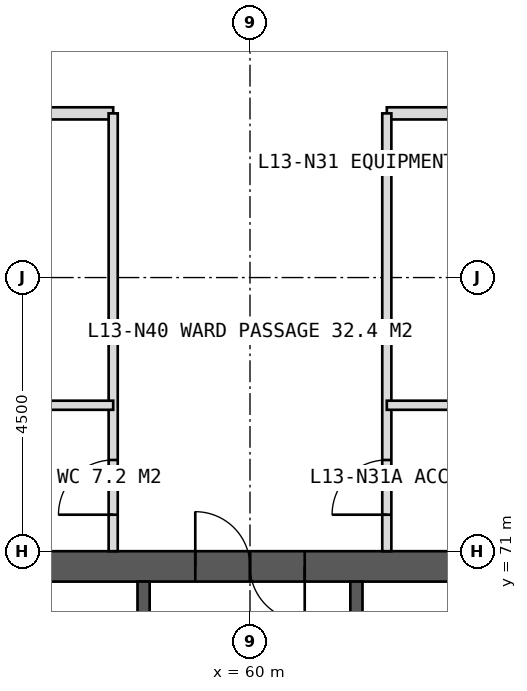
"""IFC4 building model, lengths in metres.
Left out: names, types, materials, properties, quantities, classifications, styles, units other than length and angle.
Written with IfcOpenShell. Run it as: python <this file> out.ifc"""

import sys

from ifc_helpers import new_model, si_unit, direction, frame, frame_2d, origin, place, context, subcontext, project, spatial, rectangle, extrude, element, fill, save


model = new_model("IFC4")
c1 = context("Model", 3, precision=1e-05, world=origin(), true_north=direction((0.0, 1.0)))
c2 = subcontext(c1, "Body", "Model", "MODEL_VIEW")
j1 = project(units=[si_unit("LENGTHUNIT", "METRE"), si_unit("PLANEANGLEUNIT", "RADIAN")], contexts=[c1])
p1 = place(None, origin())
s1 = spatial("IfcSite", under=j1, at=p1, CompositionType="ELEMENT")
p2 = place(p1, origin())
s2 = spatial("IfcBuilding", under=s1, at=p2, CompositionType="ELEMENT")
p3 = place(p2, frame((0.0, 0.0, 59.0)))
s3 = spatial("IfcBuildingStorey", under=s2, at=p3, CompositionType="ELEMENT", Elevation=59.0)
p4 = place(p3, frame((51.0, 70.75, 0.0), z_axis=(0.0, 0.0, 1.0), x_axis=(1.0, 0.0, 0.0)))
e1 = element("IfcWall", 1, at=p4, inside=s3, PredefinedType="SHEAR", context=c2, shape_type="SweptSolid", body=[
    extrude(rectangle(XDim=18.0, YDim=0.5, at=frame_2d((9.0, 0.0))), origin(), (0.0, 0.0, 1.0), 4.0),
])
p5 = place(p4, frame((8.1, 0.0, 0.0)))
e2 = element("IfcOpeningElement", 2, at=p5, cuts=e1, PredefinedType="OPENING", context=c2, shape_type="SweptSolid", body=[
    extrude(rectangle(XDim=1.8, YDim=2.2, at=frame_2d((0.9, 1.1))), frame((0.0, 0.26, 0.0), z_axis=(0.0, -1.0, 0.0), x_axis=(1.0, 0.0, 0.0)), (0.0, 0.0, 1.0), 0.52),
])
p6 = place(p3, frame((58.25, 53.5, 0.0), z_axis=(0.0, 0.0, 1.0), x_axis=(0.0, 1.0, 0.0)))
e3 = element("IfcWall", 3, at=p6, inside=s3, PredefinedType="SHEAR", context=c2, shape_type="SweptSolid", body=[
    extrude(rectangle(XDim=17.0, YDim=0.2, at=frame_2d((8.5, 0.0))), origin(), (0.0, 0.0, 1.0), 4.0),
])
p7 = place(p6, frame((1.375, 0.0, 0.0)))
e4 = element("IfcOpeningElement", 4, at=p7, cuts=e3, PredefinedType="OPENING", context=c2, shape_type="SweptSolid", body=[
    extrude(rectangle(XDim=1.4, YDim=2.2, at=frame_2d((0.7, 1.1))), frame((0.0, 0.11, 0.0), z_axis=(0.0, -1.0, 0.0), x_axis=(1.0, 0.0, 0.0)), (0.0, 0.0, 1.0), 0.22),
])
p8 = place(p6, frame((5.675, 0.0, 0.0)))
e5 = element("IfcOpeningElement", 5, at=p8, cuts=e3, PredefinedType="OPENING", context=c2, shape_type="SweptSolid", body=[
    extrude(rectangle(XDim=1.4, YDim=2.2, at=frame_2d((0.7, 1.1))), frame((0.0, 0.11, 0.0), z_axis=(0.0, -1.0, 0.0), x_axis=(1.0, 0.0, 0.0)), (0.0, 0.0, 1.0), 0.22),
])
p9 = place(p3, frame((61.75, 53.5, 0.0), z_axis=(0.0, 0.0, 1.0), x_axis=(0.0, 1.0, 0.0)))
e6 = element("IfcWall", 6, at=p9, inside=s3, PredefinedType="SHEAR", context=c2, shape_type="SweptSolid", body=[
    extrude(rectangle(XDim=17.0, YDim=0.2, at=frame_2d((8.5, 0.0))), origin(), (0.0, 0.0, 1.0), 4.0),
])
p10 = place(p9, frame((1.375, 0.0, 0.0)))
e7 = element("IfcOpeningElement", 7, at=p10, cuts=e6, PredefinedType="OPENING", context=c2, shape_type="SweptSolid", body=[
    extrude(rectangle(XDim=1.4, YDim=2.2, at=frame_2d((0.7, 1.1))), frame((0.0, 0.11, 0.0), z_axis=(0.0, -1.0, 0.0), x_axis=(1.0, 0.0, 0.0)), (0.0, 0.0, 1.0), 0.22),
])
p11 = place(p9, frame((5.675, 0.0, 0.0)))
e8 = element("IfcOpeningElement", 8, at=p11, cuts=e6, PredefinedType="OPENING", context=c2, shape_type="SweptSolid", body=[
    extrude(rectangle(XDim=1.4, YDim=2.2, at=frame_2d((0.7, 1.1))), frame((0.0, 0.11, 0.0), z_axis=(0.0, -1.0, 0.0), x_axis=(1.0, 0.0, 0.0)), (0.0, 0.0, 1.0), 0.22),
])
p12 = place(p3, frame((43.8, 78.2, 0.0), z_axis=(0.0, 0.0, 1.0), x_axis=(1.0, 0.0, 0.0)))
e9 = element("IfcWall", 9, at=p12, inside=s3, PredefinedType="PARTITIONING", context=c2, shape_type="SweptSolid", body=[
    extrude(rectangle(XDim=13.95, YDim=0.2, at=frame_2d((6.975, 0.0))), origin(), (0.0, 0.0, 1.0), 3.75),
])
p13 = place(p12, frame((10.075, 0.0, 0.0)))
e10 = element("IfcOpeningElement", 10, at=p13, cuts=e9, PredefinedType="OPENING", context=c2, shape_type="SweptSolid", body=[
    extrude(rectangle(XDim=1.0, YDim=2.1, at=frame_2d((0.5, 1.05))), frame((0.0, 0.11, 0.0), z_axis=(0.0, -1.0, 0.0), x_axis=(1.0, 0.0, 0.0)), (0.0, 0.0, 1.0), 0.22),
])
p14 = place(p3, frame((62.25, 78.2, 0.0), z_axis=(0.0, 0.0, 1.0), x_axis=(1.0, 0.0, 0.0)))
e11 = element("IfcWall", 11, at=p14, inside=s3, PredefinedType="PARTITIONING", context=c2, shape_type="SweptSolid", body=[
    extrude(rectangle(XDim=6.75, YDim=0.2, at=frame_2d((3.375, 0.0))), origin(), (0.0, 0.0, 1.0), 3.75),
])
p15 = place(p14, frame((1.375, 0.0, 0.0)))
e12 = element("IfcOpeningElement", 12, at=p15, cuts=e11, PredefinedType="OPENING", context=c2, shape_type="SweptSolid", body=[
    extrude(rectangle(XDim=1.0, YDim=2.1, at=frame_2d((0.5, 1.05))), frame((0.0, 0.11, 0.0), z_axis=(0.0, -1.0, 0.0), x_axis=(1.0, 0.0, 0.0)), (0.0, 0.0, 1.0), 0.22),
])
p16 = place(p14, frame((5.5, 0.0, 0.0)))
e13 = element("IfcOpeningElement", 13, at=p16, cuts=e11, PredefinedType="OPENING", context=c2, shape_type="SweptSolid", body=[
    extrude(rectangle(XDim=1.0, YDim=2.1, at=frame_2d((0.5, 1.05))), frame((0.0, 0.11, 0.0), z_axis=(0.0, -1.0, 0.0), x_axis=(1.0, 0.0, 0.0)), (0.0, 0.0, 1.0), 0.22),
])
p17 = place(p3, frame((57.75, 71.0, 0.0), z_axis=(0.0, 0.0, 1.0), x_axis=(0.0, 1.0, 0.0)))
e14 = element("IfcWall", 14, at=p17, inside=s3, PredefinedType="PARTITIONING", context=c2, shape_type="SweptSolid", body=[
    extrude(rectangle(XDim=7.2, YDim=0.15, at=frame_2d((3.6, 0.0))), origin(), (0.0, 0.0, 1.0), 3.75),
])
p18 = place(p17, frame((0.6, 0.0, 0.0)))
e15 = element("IfcOpeningElement", 15, at=p18, cuts=e14, PredefinedType="OPENING", context=c2, shape_type="SweptSolid", body=[
    extrude(rectangle(XDim=0.9, YDim=2.1, at=frame_2d((0.45, 1.05))), frame((0.0, 0.085, 0.0), z_axis=(0.0, -1.0, 0.0), x_axis=(1.0, 0.0, 0.0)), (0.0, 0.0, 1.0), 0.17),
])
p19 = place(p3, frame((62.25, 71.0, 0.0), z_axis=(0.0, 0.0, 1.0), x_axis=(0.0, 1.0, 0.0)))
e16 = element("IfcWall", 16, at=p19, inside=s3, PredefinedType="PARTITIONING", context=c2, shape_type="SweptSolid", body=[
    extrude(rectangle(XDim=7.2, YDim=0.15, at=frame_2d((3.6, 0.0))), origin(), (0.0, 0.0, 1.0), 3.75),
])
p20 = place(p19, frame((0.6, 0.0, 0.0)))
e17 = element("IfcOpeningElement", 17, at=p20, cuts=e16, PredefinedType="OPENING", context=c2, shape_type="SweptSolid", body=[
    extrude(rectangle(XDim=0.9, YDim=2.1, at=frame_2d((0.45, 1.05))), frame((0.0, 0.085, 0.0), z_axis=(0.0, -1.0, 0.0), x_axis=(1.0, 0.0, 0.0)), (0.0, 0.0, 1.0), 0.17),
])
for number, where, z_axis, x_axis in (
    (18, (54.75, 73.4, 0.0), (0.0, 0.0, 1.0), (1.0, 0.0, 0.0)),
    (19, (62.25, 73.4, 0.0), (0.0, 0.0, 1.0), (1.0, 0.0, 0.0)),
):
    element("IfcWall", number, at=place(p3, frame(where, z_axis=z_axis, x_axis=x_axis)), inside=s3, PredefinedType="PARTITIONING", context=c2, shape_type="SweptSolid", body=[
        extrude(rectangle(XDim=3.0, YDim=0.15, at=frame_2d((1.5, 0.0))), origin(), (0.0, 0.0, 1.0), 3.75),
    ])
p21 = place(p18, origin())
e20 = element("IfcDoor", 20, at=p21, inside=s3, OperationType="SINGLE_SWING_LEFT", PredefinedType="DOOR", context=c2, shape_type="SweptSolid", body=[
    extrude(rectangle(XDim=0.9, YDim=2.1, at=frame_2d((0.45, 1.05))), frame((0.0, 0.025, 0.0), z_axis=(0.0, -1.0, 0.0), x_axis=(1.0, 0.0, 0.0)), (0.0, 0.0, 1.0), 0.05),
])
fill(e15, e20)
p22 = place(p20, origin())
e21 = element("IfcDoor", 21, at=p22, inside=s3, OperationType="SINGLE_SWING_LEFT", PredefinedType="DOOR", context=c2, shape_type="SweptSolid", body=[
    extrude(rectangle(XDim=0.9, YDim=2.1, at=frame_2d((0.45, 1.05))), frame((0.0, 0.025, 0.0), z_axis=(0.0, -1.0, 0.0), x_axis=(1.0, 0.0, 0.0)), (0.0, 0.0, 1.0), 0.05),
])
fill(e17, e21)
p23 = place(p5, origin())
e22 = element("IfcDoor", 22, at=p23, inside=s3, OperationType="DOUBLE_DOOR_SINGLE_SWING", PredefinedType="DOOR", context=c2, shape_type="SweptSolid", body=[
    extrude(rectangle(XDim=1.8, YDim=2.2, at=frame_2d((0.9, 1.1))), frame((0.0, 0.025, 0.0), z_axis=(0.0, -1.0, 0.0), x_axis=(1.0, 0.0, 0.0)), (0.0, 0.0, 1.0), 0.05),
])
fill(e2, e22)
save(model, sys.argv[1])
